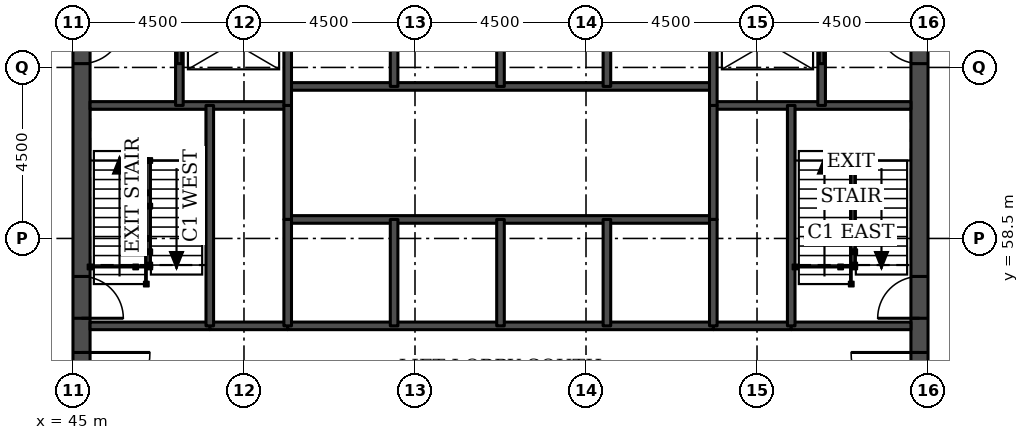
"""IFC4 building model, lengths in metres.
Left out: names, types, materials, properties, quantities, classifications, styles, units other than length and angle.
Written with IfcOpenShell. Run it as: python <this file> out.ifc"""

import sys

from ifc_helpers import new_model, si_unit, direction, frame, frame_2d, origin, place, context, subcontext, project, spatial, rectangle, extrude, element, fill, save


model = new_model("IFC4")
c1 = context("Model", 3, precision=1e-05, world=origin(), true_north=direction((0.0, 1.0)))
c2 = subcontext(c1, "Body", "Model", "MODEL_VIEW")
j1 = project(units=[si_unit("LENGTHUNIT", "METRE"), si_unit("PLANEANGLEUNIT", "RADIAN")], contexts=[c1])
p1 = place(None, origin())
s1 = spatial("IfcSite", under=j1, at=p1, CompositionType="ELEMENT")
p2 = place(p1, origin())
s2 = spatial("IfcBuilding", under=s1, at=p2, CompositionType="ELEMENT")
p3 = place(p2, frame((0.0, 0.0, 112.2)))
s3 = spatial("IfcBuildingStorey", under=s2, at=p3, CompositionType="ELEMENT", Elevation=112.2)
p4 = place(p3, frame((45.225, 49.5, 0.0), z_axis=(0.0, 0.0, 1.0), x_axis=(0.0, 1.0, 0.0)))
e1 = element("IfcWall", 1, at=p4, inside=s3, PredefinedType="SHEAR", context=c2, shape_type="SweptSolid", body=[
    extrude(rectangle(XDim=22.5, YDim=0.45, at=frame_2d((11.25, 0.0))), origin(), (0.0, 0.0, 1.0), 3.7),
])
p5 = place(p4, frame((4.2, 0.0, 0.0)))
e2 = element("IfcOpeningElement", 2, at=p5, cuts=e1, PredefinedType="OPENING", context=c2, shape_type="SweptSolid", body=[
    extrude(rectangle(XDim=1.8, YDim=2.1, at=frame_2d((0.9, 1.05))), frame((0.0, 0.235, 0.0), z_axis=(0.0, -1.0, 0.0), x_axis=(1.0, 0.0, 0.0)), (0.0, 0.0, 1.0), 0.47),
])
p6 = place(p4, frame((6.9, 0.0, 0.0)))
e3 = element("IfcOpeningElement", 3, at=p6, cuts=e1, PredefinedType="OPENING", context=c2, shape_type="SweptSolid", body=[
    extrude(rectangle(XDim=1.1, YDim=2.1, at=frame_2d((0.55, 1.05))), frame((0.0, 0.235, 0.0), z_axis=(0.0, -1.0, 0.0), x_axis=(1.0, 0.0, 0.0)), (0.0, 0.0, 1.0), 0.47),
])
p7 = place(p4, frame((13.6, 0.0, 0.0)))
e4 = element("IfcOpeningElement", 4, at=p7, cuts=e1, PredefinedType="OPENING", context=c2, shape_type="SweptSolid", body=[
    extrude(rectangle(XDim=1.1, YDim=2.1, at=frame_2d((0.55, 1.05))), frame((0.0, 0.235, 0.0), z_axis=(0.0, -1.0, 0.0), x_axis=(1.0, 0.0, 0.0)), (0.0, 0.0, 1.0), 0.47),
])
p8 = place(p4, frame((16.5, 0.0, 0.0)))
e5 = element("IfcOpeningElement", 5, at=p8, cuts=e1, PredefinedType="OPENING", context=c2, shape_type="SweptSolid", body=[
    extrude(rectangle(XDim=1.8, YDim=2.1, at=frame_2d((0.9, 1.05))), frame((0.0, 0.235, 0.0), z_axis=(0.0, -1.0, 0.0), x_axis=(1.0, 0.0, 0.0)), (0.0, 0.0, 1.0), 0.47),
])
p9 = place(p3, frame((67.275, 49.5, 0.0), z_axis=(0.0, 0.0, 1.0), x_axis=(0.0, 1.0, 0.0)))
e6 = element("IfcWall", 6, at=p9, inside=s3, PredefinedType="SHEAR", context=c2, shape_type="SweptSolid", body=[
    extrude(rectangle(XDim=22.5, YDim=0.45, at=frame_2d((11.25, 0.0))), origin(), (0.0, 0.0, 1.0), 3.7),
])
p10 = place(p9, frame((4.2, 0.0, 0.0)))
e7 = element("IfcOpeningElement", 7, at=p10, cuts=e6, PredefinedType="OPENING", context=c2, shape_type="SweptSolid", body=[
    extrude(rectangle(XDim=1.8, YDim=2.1, at=frame_2d((0.9, 1.05))), frame((0.0, 0.235, 0.0), z_axis=(0.0, -1.0, 0.0), x_axis=(1.0, 0.0, 0.0)), (0.0, 0.0, 1.0), 0.47),
])
p11 = place(p9, frame((6.9, 0.0, 0.0)))
e8 = element("IfcOpeningElement", 8, at=p11, cuts=e6, PredefinedType="OPENING", context=c2, shape_type="SweptSolid", body=[
    extrude(rectangle(XDim=1.1, YDim=2.1, at=frame_2d((0.55, 1.05))), frame((0.0, 0.235, 0.0), z_axis=(0.0, -1.0, 0.0), x_axis=(1.0, 0.0, 0.0)), (0.0, 0.0, 1.0), 0.47),
])
p12 = place(p9, frame((13.6, 0.0, 0.0)))
e9 = element("IfcOpeningElement", 9, at=p12, cuts=e6, PredefinedType="OPENING", context=c2, shape_type="SweptSolid", body=[
    extrude(rectangle(XDim=1.1, YDim=2.1, at=frame_2d((0.55, 1.05))), frame((0.0, 0.235, 0.0), z_axis=(0.0, -1.0, 0.0), x_axis=(1.0, 0.0, 0.0)), (0.0, 0.0, 1.0), 0.47),
])
p13 = place(p9, frame((16.5, 0.0, 0.0)))
e10 = element("IfcOpeningElement", 10, at=p13, cuts=e6, PredefinedType="OPENING", context=c2, shape_type="SweptSolid", body=[
    extrude(rectangle(XDim=1.8, YDim=2.1, at=frame_2d((0.9, 1.05))), frame((0.0, 0.235, 0.0), z_axis=(0.0, -1.0, 0.0), x_axis=(1.0, 0.0, 0.0)), (0.0, 0.0, 1.0), 0.47),
])
for number, where, z_axis, x_axis in (
    (11, (48.6, 56.2, 0.0), (0.0, 0.0, 1.0), (1.0, 0.0, 0.0)),
    (12, (61.85, 56.2, 0.0), (0.0, 0.0, 1.0), (1.0, 0.0, 0.0)),
):
    element("IfcWall", number, at=place(p3, frame(where, z_axis=z_axis, x_axis=x_axis)), inside=s3, PredefinedType="SOLIDWALL", context=c2, shape_type="SweptSolid", body=[
        extrude(rectangle(XDim=2.05, YDim=0.2, at=frame_2d((1.025, 0.0))), origin(), (0.0, 0.0, 1.0), 3.55),
    ])
p14 = place(p3, frame((45.45, 56.2, 0.0), z_axis=(0.0, 0.0, 1.0), x_axis=(1.0, 0.0, 0.0)))
e13 = element("IfcWall", 13, at=p14, inside=s3, PredefinedType="SOLIDWALL", context=c2, shape_type="SweptSolid", body=[
    extrude(rectangle(XDim=3.15, YDim=0.2, at=frame_2d((1.575, 0.0))), origin(), (0.0, 0.0, 1.0), 3.55),
])
p15 = place(p3, frame((50.65, 56.2, 0.0), z_axis=(0.0, 0.0, 1.0), x_axis=(1.0, 0.0, 0.0)))
e14 = element("IfcWall", 14, at=p15, inside=s3, PredefinedType="SOLIDWALL", context=c2, shape_type="SweptSolid", body=[
    extrude(rectangle(XDim=11.2, YDim=0.2, at=frame_2d((5.6, 0.0))), origin(), (0.0, 0.0, 1.0), 3.55),
])
p16 = place(p3, frame((63.9, 56.2, 0.0), z_axis=(0.0, 0.0, 1.0), x_axis=(1.0, 0.0, 0.0)))
e15 = element("IfcWall", 15, at=p16, inside=s3, PredefinedType="SOLIDWALL", context=c2, shape_type="SweptSolid", body=[
    extrude(rectangle(XDim=3.15, YDim=0.2, at=frame_2d((1.575, 0.0))), origin(), (0.0, 0.0, 1.0), 3.55),
])
p17 = place(p3, frame((50.65, 59.0, 0.0), z_axis=(0.0, 0.0, 1.0), x_axis=(1.0, 0.0, 0.0)))
e16 = element("IfcWall", 16, at=p17, inside=s3, PredefinedType="SOLIDWALL", context=c2, shape_type="SweptSolid", body=[
    extrude(rectangle(XDim=11.2, YDim=0.2, at=frame_2d((5.6, 0.0))), origin(), (0.0, 0.0, 1.0), 3.7),
])
for number, where, z_axis, x_axis in (
    (17, (45.45, 62.0, 0.0), (0.0, 0.0, 1.0), (1.0, 0.0, 0.0)),
    (18, (61.85, 62.0, 0.0), (0.0, 0.0, 1.0), (1.0, 0.0, 0.0)),
):
    element("IfcWall", number, at=place(p3, frame(where, z_axis=z_axis, x_axis=x_axis)), inside=s3, PredefinedType="SOLIDWALL", context=c2, shape_type="SweptSolid", body=[
        extrude(rectangle(XDim=5.2, YDim=0.2, at=frame_2d((2.6, 0.0))), origin(), (0.0, 0.0, 1.0), 3.55),
    ])
p18 = place(p3, frame((50.65, 62.5, 0.0), z_axis=(0.0, 0.0, 1.0), x_axis=(1.0, 0.0, 0.0)))
e19 = element("IfcWall", 19, at=p18, inside=s3, PredefinedType="SOLIDWALL", context=c2, shape_type="SweptSolid", body=[
    extrude(rectangle(XDim=11.2, YDim=0.2, at=frame_2d((5.6, 0.0))), origin(), (0.0, 0.0, 1.0), 3.7),
])
p19 = place(p3, frame((47.8, 62.0, 0.0), z_axis=(0.0, 0.0, 1.0), x_axis=(0.0, 1.0, 0.0)))
e20 = element("IfcWall", 20, at=p19, inside=s3, PredefinedType="SOLIDWALL", context=c2, shape_type="SweptSolid", body=[
    extrude(rectangle(XDim=3.3, YDim=0.2, at=frame_2d((1.65, 0.0))), origin(), (0.0, 0.0, 1.0), 3.55),
])
p20 = place(p19, frame((1.1, 0.0, 0.0)))
e21 = element("IfcOpeningElement", 21, at=p20, cuts=e20, PredefinedType="OPENING", context=c2, shape_type="SweptSolid", body=[
    extrude(rectangle(XDim=1.1, YDim=2.1, at=frame_2d((0.55, 1.05))), frame((0.0, 0.11, 0.0), z_axis=(0.0, -1.0, 0.0), x_axis=(1.0, 0.0, 0.0)), (0.0, 0.0, 1.0), 0.22),
])
p21 = place(p3, frame((48.6, 56.2, 0.0), z_axis=(0.0, 0.0, 1.0), x_axis=(0.0, 1.0, 0.0)))
e22 = element("IfcWall", 22, at=p21, inside=s3, PredefinedType="SOLIDWALL", context=c2, shape_type="SweptSolid", body=[
    extrude(rectangle(XDim=5.8, YDim=0.2, at=frame_2d((2.9, 0.0))), origin(), (0.0, 0.0, 1.0), 3.55),
])
p22 = place(p3, frame((50.65, 59.0, 0.0), z_axis=(0.0, 0.0, 1.0), x_axis=(0.0, 1.0, 0.0)))
e23 = element("IfcWall", 23, at=p22, inside=s3, PredefinedType="SOLIDWALL", context=c2, shape_type="SweptSolid", body=[
    extrude(rectangle(XDim=3.0, YDim=0.2, at=frame_2d((1.5, 0.0))), origin(), (0.0, 0.0, 1.0), 3.7),
])
p23 = place(p3, frame((50.65, 56.2, 0.0), z_axis=(0.0, 0.0, 1.0), x_axis=(0.0, 1.0, 0.0)))
e24 = element("IfcWall", 24, at=p23, inside=s3, PredefinedType="SOLIDWALL", context=c2, shape_type="SweptSolid", body=[
    extrude(rectangle(XDim=2.8, YDim=0.2, at=frame_2d((1.4, 0.0))), origin(), (0.0, 0.0, 1.0), 3.55),
])
p24 = place(p3, frame((50.65, 62.0, 0.0), z_axis=(0.0, 0.0, 1.0), x_axis=(0.0, 1.0, 0.0)))
e25 = element("IfcWall", 25, at=p24, inside=s3, PredefinedType="SOLIDWALL", context=c2, shape_type="SweptSolid", body=[
    extrude(rectangle(XDim=3.3, YDim=0.2, at=frame_2d((1.65, 0.0))), origin(), (0.0, 0.0, 1.0), 3.55),
])
for number, where, z_axis, x_axis in (
    (26, (53.45, 56.2, 0.0), (0.0, 0.0, 1.0), (0.0, 1.0, 0.0)),
    (27, (53.45, 62.5, 0.0), (0.0, 0.0, 1.0), (0.0, 1.0, 0.0)),
    (28, (56.25, 56.2, 0.0), (0.0, 0.0, 1.0), (0.0, 1.0, 0.0)),
    (29, (56.25, 62.5, 0.0), (0.0, 0.0, 1.0), (0.0, 1.0, 0.0)),
    (30, (59.05, 56.2, 0.0), (0.0, 0.0, 1.0), (0.0, 1.0, 0.0)),
    (31, (59.05, 62.5, 0.0), (0.0, 0.0, 1.0), (0.0, 1.0, 0.0)),
):
    element("IfcWall", number, at=place(p3, frame(where, z_axis=z_axis, x_axis=x_axis)), inside=s3, PredefinedType="SOLIDWALL", context=c2, shape_type="SweptSolid", body=[
        extrude(rectangle(XDim=2.8, YDim=0.2, at=frame_2d((1.4, 0.0))), origin(), (0.0, 0.0, 1.0), 3.55),
    ])
p25 = place(p3, frame((61.85, 59.0, 0.0), z_axis=(0.0, 0.0, 1.0), x_axis=(0.0, 1.0, 0.0)))
e32 = element("IfcWall", 32, at=p25, inside=s3, PredefinedType="SOLIDWALL", context=c2, shape_type="SweptSolid", body=[
    extrude(rectangle(XDim=3.0, YDim=0.2, at=frame_2d((1.5, 0.0))), origin(), (0.0, 0.0, 1.0), 3.7),
])
p26 = place(p3, frame((61.85, 56.2, 0.0), z_axis=(0.0, 0.0, 1.0), x_axis=(0.0, 1.0, 0.0)))
e33 = element("IfcWall", 33, at=p26, inside=s3, PredefinedType="SOLIDWALL", context=c2, shape_type="SweptSolid", body=[
    extrude(rectangle(XDim=2.8, YDim=0.2, at=frame_2d((1.4, 0.0))), origin(), (0.0, 0.0, 1.0), 3.55),
])
p27 = place(p3, frame((61.85, 62.0, 0.0), z_axis=(0.0, 0.0, 1.0), x_axis=(0.0, 1.0, 0.0)))
e34 = element("IfcWall", 34, at=p27, inside=s3, PredefinedType="SOLIDWALL", context=c2, shape_type="SweptSolid", body=[
    extrude(rectangle(XDim=3.3, YDim=0.2, at=frame_2d((1.65, 0.0))), origin(), (0.0, 0.0, 1.0), 3.55),
])
p28 = place(p3, frame((63.9, 56.2, 0.0), z_axis=(0.0, 0.0, 1.0), x_axis=(0.0, 1.0, 0.0)))
e35 = element("IfcWall", 35, at=p28, inside=s3, PredefinedType="SOLIDWALL", context=c2, shape_type="SweptSolid", body=[
    extrude(rectangle(XDim=5.8, YDim=0.2, at=frame_2d((2.9, 0.0))), origin(), (0.0, 0.0, 1.0), 3.55),
])
p29 = place(p3, frame((64.7, 62.0, 0.0), z_axis=(0.0, 0.0, 1.0), x_axis=(0.0, 1.0, 0.0)))
e36 = element("IfcWall", 36, at=p29, inside=s3, PredefinedType="SOLIDWALL", context=c2, shape_type="SweptSolid", body=[
    extrude(rectangle(XDim=3.3, YDim=0.2, at=frame_2d((1.65, 0.0))), origin(), (0.0, 0.0, 1.0), 3.55),
])
p30 = place(p29, frame((1.1, 0.0, 0.0)))
e37 = element("IfcOpeningElement", 37, at=p30, cuts=e36, PredefinedType="OPENING", context=c2, shape_type="SweptSolid", body=[
    extrude(rectangle(XDim=1.1, YDim=2.1, at=frame_2d((0.55, 1.05))), frame((0.0, 0.11, 0.0), z_axis=(0.0, -1.0, 0.0), x_axis=(1.0, 0.0, 0.0)), (0.0, 0.0, 1.0), 0.22),
])
p31 = place(p20, origin())
e38 = element("IfcDoor", 38, at=p31, inside=s3, OperationType="DOUBLE_DOOR_SLIDING", PredefinedType="DOOR", context=c2, shape_type="SweptSolid", body=[
    extrude(rectangle(XDim=1.1, YDim=2.1, at=frame_2d((0.55, 1.05))), frame((0.0, 0.025, 0.0), z_axis=(0.0, -1.0, 0.0), x_axis=(1.0, 0.0, 0.0)), (0.0, 0.0, 1.0), 0.05),
])
fill(e21, e38)
p32 = place(p30, origin())
e39 = element("IfcDoor", 39, at=p32, inside=s3, OperationType="DOUBLE_DOOR_SLIDING", PredefinedType="DOOR", context=c2, shape_type="SweptSolid", body=[
    extrude(rectangle(XDim=1.1, YDim=2.1, at=frame_2d((0.55, 1.05))), frame((0.0, 0.025, 0.0), z_axis=(0.0, -1.0, 0.0), x_axis=(1.0, 0.0, 0.0)), (0.0, 0.0, 1.0), 0.05),
])
fill(e37, e39)
p33 = place(p5, frame((1.8, 0.0, 0.0), z_axis=(0.0, 0.0, 1.0), x_axis=(-1.0, 0.0, 0.0)))
e40 = element("IfcDoor", 40, at=p33, inside=s3, OperationType="SINGLE_SWING_LEFT", PredefinedType="DOOR", context=c2, shape_type="SweptSolid", body=[
    extrude(rectangle(XDim=1.8, YDim=2.1, at=frame_2d((0.9, 1.05))), frame((0.0, 0.025, 0.0), z_axis=(0.0, -1.0, 0.0), x_axis=(1.0, 0.0, 0.0)), (0.0, 0.0, 1.0), 0.05),
])
fill(e2, e40)
p34 = place(p6, frame((1.1, 0.0, 0.0), z_axis=(0.0, 0.0, 1.0), x_axis=(-1.0, 0.0, 0.0)))
e41 = element("IfcDoor", 41, at=p34, inside=s3, OperationType="SINGLE_SWING_RIGHT", PredefinedType="DOOR", context=c2, shape_type="SweptSolid", body=[
    extrude(rectangle(XDim=1.1, YDim=2.1, at=frame_2d((0.55, 1.05))), frame((0.0, 0.025, 0.0), z_axis=(0.0, -1.0, 0.0), x_axis=(1.0, 0.0, 0.0)), (0.0, 0.0, 1.0), 0.05),
])
fill(e3, e41)
p35 = place(p7, frame((1.1, 0.0, 0.0), z_axis=(0.0, 0.0, 1.0), x_axis=(-1.0, 0.0, 0.0)))
e42 = element("IfcDoor", 42, at=p35, inside=s3, OperationType="SINGLE_SWING_LEFT", PredefinedType="DOOR", context=c2, shape_type="SweptSolid", body=[
    extrude(rectangle(XDim=1.1, YDim=2.1, at=frame_2d((0.55, 1.05))), frame((0.0, 0.025, 0.0), z_axis=(0.0, -1.0, 0.0), x_axis=(1.0, 0.0, 0.0)), (0.0, 0.0, 1.0), 0.05),
])
fill(e4, e42)
p36 = place(p10, origin())
e43 = element("IfcDoor", 43, at=p36, inside=s3, OperationType="SINGLE_SWING_RIGHT", PredefinedType="DOOR", context=c2, shape_type="SweptSolid", body=[
    extrude(rectangle(XDim=1.8, YDim=2.1, at=frame_2d((0.9, 1.05))), frame((0.0, 0.025, 0.0), z_axis=(0.0, -1.0, 0.0), x_axis=(1.0, 0.0, 0.0)), (0.0, 0.0, 1.0), 0.05),
])
fill(e7, e43)
p37 = place(p11, origin())
e44 = element("IfcDoor", 44, at=p37, inside=s3, OperationType="SINGLE_SWING_LEFT", PredefinedType="DOOR", context=c2, shape_type="SweptSolid", body=[
    extrude(rectangle(XDim=1.1, YDim=2.1, at=frame_2d((0.55, 1.05))), frame((0.0, 0.025, 0.0), z_axis=(0.0, -1.0, 0.0), x_axis=(1.0, 0.0, 0.0)), (0.0, 0.0, 1.0), 0.05),
])
fill(e8, e44)
p38 = place(p12, origin())
e45 = element("IfcDoor", 45, at=p38, inside=s3, OperationType="SINGLE_SWING_RIGHT", PredefinedType="DOOR", context=c2, shape_type="SweptSolid", body=[
    extrude(rectangle(XDim=1.1, YDim=2.1, at=frame_2d((0.55, 1.05))), frame((0.0, 0.025, 0.0), z_axis=(0.0, -1.0, 0.0), x_axis=(1.0, 0.0, 0.0)), (0.0, 0.0, 1.0), 0.05),
])
fill(e9, e45)
save(model, sys.argv[1])
